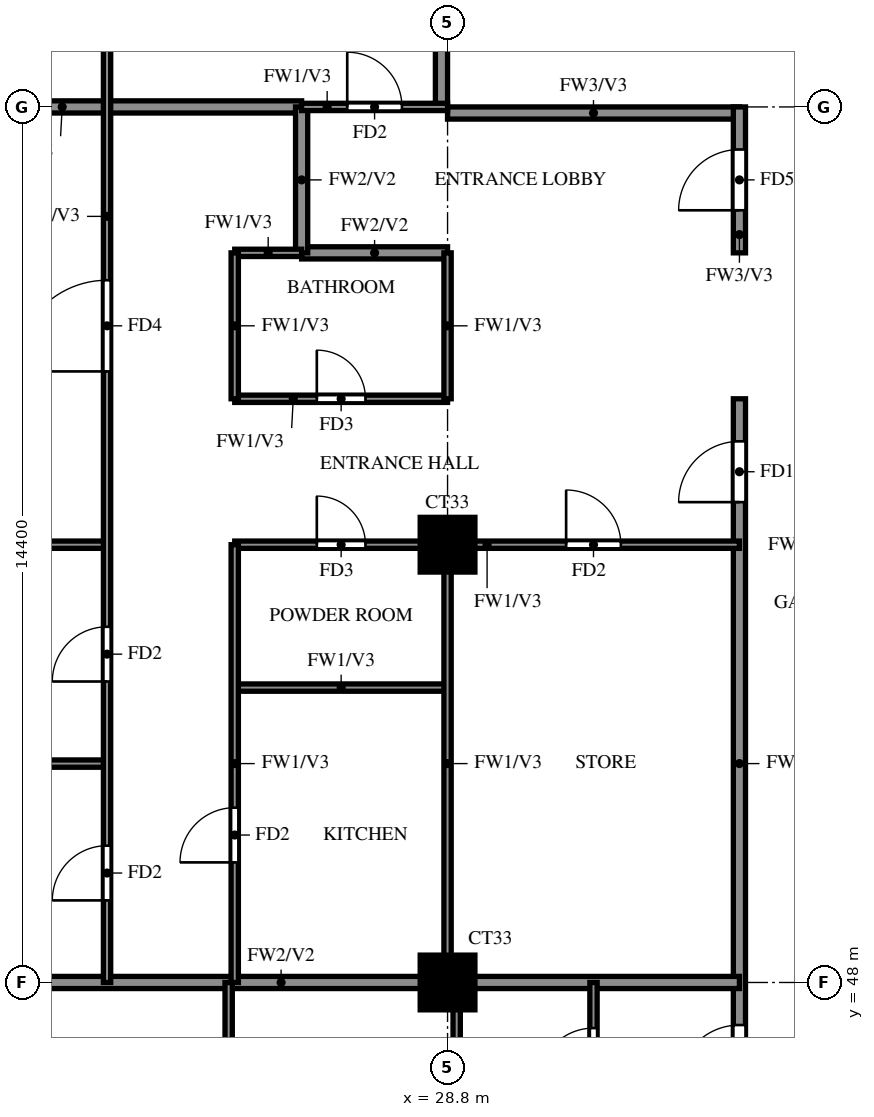
"""IFC4 building model, lengths in metres.
Left out: names, types, materials, properties, quantities, classifications, styles, units other than length and angle.
Written with IfcOpenShell. Run it as: python <this file> out.ifc"""

import sys

from ifc_helpers import new_model, si_unit, direction, frame, frame_2d, origin, origin_2d, place, context, subcontext, project, spatial, rectangle, extrude, source, transform, mapped, element, fill, save


model = new_model("IFC4")
c1 = context("Model", 3, precision=1e-05, world=origin(), true_north=direction((0.0, 1.0)))
c2 = subcontext(c1, "Body", "Model", "MODEL_VIEW")
j1 = project(units=[si_unit("LENGTHUNIT", "METRE"), si_unit("PLANEANGLEUNIT", "RADIAN")], contexts=[c1])
p1 = place(None, origin())
s1 = spatial("IfcSite", under=j1, at=p1, CompositionType="ELEMENT")
p2 = place(p1, origin())
s2 = spatial("IfcBuilding", under=s1, at=p2, CompositionType="ELEMENT")
p3 = place(p2, frame((0.0, 0.0, 229.0)))
s3 = spatial("IfcBuildingStorey", under=s2, at=p3, CompositionType="ELEMENT", Elevation=229.0)
m1 = source(origin(), c2, "Body", "SweptSolid", [
    extrude(rectangle(XDim=0.9, YDim=0.9, at=origin_2d()), origin(), (0.0, 0.0, 1.0), 3.22),
])
for number, where, z_axis, x_axis in (
    (1, (28.8, 48.0, 0.0), (0.0, 0.0, 1.0), (1.0, 0.0, 0.0)),
    (2, (28.8, 55.2, 0.0), (0.0, 0.0, 1.0), (1.0, 0.0, 0.0)),
):
    element("IfcColumn", number, at=place(p3, frame(where, z_axis=z_axis, x_axis=x_axis)), inside=s3, PredefinedType="COLUMN", context=c2, shape_type="MappedRepresentation", body=[
        mapped(m1, transform((0.0, 0.0, 0.0))),
    ])
p4 = place(p3, frame((28.8, 62.3, 0.0), z_axis=(0.0, 0.0, 1.0), x_axis=(1.0, 0.0, 0.0)))
e3 = element("IfcWall", 3, at=p4, inside=s3, PredefinedType="SOLIDWALL", context=c2, shape_type="SweptSolid", body=[
    extrude(rectangle(XDim=4.8, YDim=0.2, at=frame_2d((2.4, 0.0))), origin(), (0.0, 0.0, 1.0), 3.22),
])
p5 = place(p3, frame((28.7, 62.4, 0.0), z_axis=(0.0, 0.0, 1.0), x_axis=(0.0, 1.0, 0.0)))
e4 = element("IfcWall", 4, at=p5, inside=s3, PredefinedType="SOLIDWALL", context=c2, shape_type="SweptSolid", body=[
    extrude(rectangle(XDim=15.6, YDim=0.2, at=frame_2d((7.8, 0.0))), origin(), (0.0, 0.0, 1.0), 3.22),
])
p6 = place(p3, frame((33.6, 45.6, 0.0), z_axis=(0.0, 0.0, 1.0), x_axis=(0.0, 1.0, 0.0)))
e5 = element("IfcWall", 5, at=p6, inside=s3, PredefinedType="SOLIDWALL", context=c2, shape_type="SweptSolid", body=[
    extrude(rectangle(XDim=12.0, YDim=0.2, at=frame_2d((6.0, 0.0))), origin(), (0.0, 0.0, 1.0), 3.22),
])
p7 = place(p6, frame((0.7, 0.0, 0.0)))
e6 = element("IfcOpeningElement", 6, at=p7, cuts=e5, PredefinedType="OPENING", context=c2, shape_type="SweptSolid", body=[
    extrude(rectangle(XDim=1.0, YDim=2.1, at=frame_2d((0.5, 1.05))), frame((0.0, 0.11, 0.0), z_axis=(0.0, -1.0, 0.0), x_axis=(1.0, 0.0, 0.0)), (0.0, 0.0, 1.0), 0.22),
])
p8 = place(p6, frame((10.3, 0.0, 0.0)))
e7 = element("IfcOpeningElement", 7, at=p8, cuts=e5, PredefinedType="OPENING", context=c2, shape_type="SweptSolid", body=[
    extrude(rectangle(XDim=1.0, YDim=2.1, at=frame_2d((0.5, 1.05))), frame((0.0, 0.11, 0.0), z_axis=(0.0, -1.0, 0.0), x_axis=(1.0, 0.0, 0.0)), (0.0, 0.0, 1.0), 0.22),
])
p9 = place(p3, frame((33.6, 60.0, 0.0), z_axis=(0.0, 0.0, 1.0), x_axis=(0.0, 1.0, 0.0)))
e8 = element("IfcWall", 8, at=p9, inside=s3, PredefinedType="SOLIDWALL", context=c2, shape_type="SweptSolid", body=[
    extrude(rectangle(XDim=2.4, YDim=0.2, at=frame_2d((1.2, 0.0))), origin(), (0.0, 0.0, 1.0), 3.22),
])
p10 = place(p9, frame((0.7, 0.0, 0.0)))
e9 = element("IfcOpeningElement", 9, at=p10, cuts=e8, PredefinedType="OPENING", context=c2, shape_type="SweptSolid", body=[
    extrude(rectangle(XDim=1.0, YDim=2.1, at=frame_2d((0.5, 1.05))), frame((0.0, 0.11, 0.0), z_axis=(0.0, -1.0, 0.0), x_axis=(1.0, 0.0, 0.0)), (0.0, 0.0, 1.0), 0.22),
])
p11 = place(p3, frame((18.525, 48.0, 0.0), z_axis=(0.0, 0.0, 1.0), x_axis=(1.0, 0.0, 0.0)))
e10 = element("IfcWall", 10, at=p11, inside=s3, PredefinedType="SOLIDWALL", context=c2, shape_type="SweptSolid", body=[
    extrude(rectangle(XDim=15.075, YDim=0.2, at=frame_2d((7.538, 0.0))), origin(), (0.0, 0.0, 1.0), 3.22),
])
p12 = place(p3, frame((26.4, 60.0, 0.0), z_axis=(0.0, 0.0, 1.0), x_axis=(1.0, 0.0, 0.0)))
e11 = element("IfcWall", 11, at=p12, inside=s3, PredefinedType="SOLIDWALL", context=c2, shape_type="SweptSolid", body=[
    extrude(rectangle(XDim=2.4, YDim=0.2, at=frame_2d((1.2, 0.0))), origin(), (0.0, 0.0, 1.0), 3.22),
])
p13 = place(p3, frame((18.525, 62.4, 0.0), z_axis=(0.0, 0.0, 1.0), x_axis=(1.0, 0.0, 0.0)))
e12 = element("IfcWall", 12, at=p13, inside=s3, PredefinedType="SOLIDWALL", context=c2, shape_type="SweptSolid", body=[
    extrude(rectangle(XDim=7.875, YDim=0.2, at=frame_2d((3.938, 0.0))), origin(), (0.0, 0.0, 1.0), 3.22),
])
p14 = place(p3, frame((26.4, 60.0, 0.0), z_axis=(0.0, 0.0, 1.0), x_axis=(0.0, 1.0, 0.0)))
e13 = element("IfcWall", 13, at=p14, inside=s3, PredefinedType="SOLIDWALL", context=c2, shape_type="SweptSolid", body=[
    extrude(rectangle(XDim=2.4, YDim=0.2, at=frame_2d((1.2, 0.0))), origin(), (0.0, 0.0, 1.0), 3.22),
])
p15 = place(p3, frame((18.525, 51.6, 0.0), z_axis=(0.0, 0.0, 1.0), x_axis=(1.0, 0.0, 0.0)))
e14 = element("IfcWall", 14, at=p15, inside=s3, PredefinedType="PARTITIONING", context=c2, shape_type="SweptSolid", body=[
    extrude(rectangle(XDim=4.675, YDim=0.12, at=frame_2d((2.337, 0.0))), origin(), (0.0, 0.0, 1.0), 2.32),
])
p16 = place(p3, frame((25.3, 52.85, 0.0), z_axis=(0.0, 0.0, 1.0), x_axis=(1.0, 0.0, 0.0)))
e15 = element("IfcWall", 15, at=p16, inside=s3, PredefinedType="PARTITIONING", context=c2, shape_type="SweptSolid", body=[
    extrude(rectangle(XDim=3.5, YDim=0.12, at=frame_2d((1.75, 0.0))), origin(), (0.0, 0.0, 1.0), 3.22),
])
p17 = place(p3, frame((18.525, 55.2, 0.0), z_axis=(0.0, 0.0, 1.0), x_axis=(1.0, 0.0, 0.0)))
e16 = element("IfcWall", 16, at=p17, inside=s3, PredefinedType="PARTITIONING", context=c2, shape_type="SweptSolid", body=[
    extrude(rectangle(XDim=4.675, YDim=0.12, at=frame_2d((2.337, 0.0))), origin(), (0.0, 0.0, 1.0), 3.22),
])
p18 = place(p3, frame((25.3, 55.2, 0.0), z_axis=(0.0, 0.0, 1.0), x_axis=(1.0, 0.0, 0.0)))
e17 = element("IfcWall", 17, at=p18, inside=s3, PredefinedType="PARTITIONING", context=c2, shape_type="SweptSolid", body=[
    extrude(rectangle(XDim=8.3, YDim=0.12, at=frame_2d((4.15, 0.0))), origin(), (0.0, 0.0, 1.0), 3.22),
])
p19 = place(p18, frame((1.35, 0.0, 0.0)))
e18 = element("IfcOpeningElement", 18, at=p19, cuts=e17, PredefinedType="OPENING", context=c2, shape_type="SweptSolid", body=[
    extrude(rectangle(XDim=0.8, YDim=2.1, at=frame_2d((0.4, 1.05))), frame((0.0, 0.07, 0.0), z_axis=(0.0, -1.0, 0.0), x_axis=(1.0, 0.0, 0.0)), (0.0, 0.0, 1.0), 0.14),
])
p20 = place(p18, frame((5.45, 0.0, 0.0)))
e19 = element("IfcOpeningElement", 19, at=p20, cuts=e17, PredefinedType="OPENING", context=c2, shape_type="SweptSolid", body=[
    extrude(rectangle(XDim=0.9, YDim=2.1, at=frame_2d((0.45, 1.05))), frame((0.0, 0.07, 0.0), z_axis=(0.0, -1.0, 0.0), x_axis=(1.0, 0.0, 0.0)), (0.0, 0.0, 1.0), 0.14),
])
p21 = place(p3, frame((25.3, 57.6, 0.0), z_axis=(0.0, 0.0, 1.0), x_axis=(1.0, 0.0, 0.0)))
e20 = element("IfcWall", 20, at=p21, inside=s3, PredefinedType="PARTITIONING", context=c2, shape_type="SweptSolid", body=[
    extrude(rectangle(XDim=3.5, YDim=0.12, at=frame_2d((1.75, 0.0))), origin(), (0.0, 0.0, 1.0), 3.22),
])
p22 = place(p21, frame((1.35, 0.0, 0.0)))
e21 = element("IfcOpeningElement", 21, at=p22, cuts=e20, PredefinedType="OPENING", context=c2, shape_type="SweptSolid", body=[
    extrude(rectangle(XDim=0.8, YDim=2.1, at=frame_2d((0.4, 1.05))), frame((0.0, 0.07, 0.0), z_axis=(0.0, -1.0, 0.0), x_axis=(1.0, 0.0, 0.0)), (0.0, 0.0, 1.0), 0.14),
])
p23 = place(p3, frame((25.3, 60.0, 0.0), z_axis=(0.0, 0.0, 1.0), x_axis=(1.0, 0.0, 0.0)))
e22 = element("IfcWall", 22, at=p23, inside=s3, PredefinedType="PARTITIONING", context=c2, shape_type="SweptSolid", body=[
    extrude(rectangle(XDim=1.1, YDim=0.12, at=frame_2d((0.55, 0.0))), origin(), (0.0, 0.0, 1.0), 3.22),
])
p24 = place(p3, frame((26.4, 62.4, 0.0), z_axis=(0.0, 0.0, 1.0), x_axis=(1.0, 0.0, 0.0)))
e23 = element("IfcWall", 23, at=p24, inside=s3, PredefinedType="PARTITIONING", context=c2, shape_type="SweptSolid", body=[
    extrude(rectangle(XDim=2.4, YDim=0.12, at=frame_2d((1.2, 0.0))), origin(), (0.0, 0.0, 1.0), 3.22),
])
p25 = place(p24, frame((0.75, 0.0, 0.0)))
e24 = element("IfcOpeningElement", 24, at=p25, cuts=e23, PredefinedType="OPENING", context=c2, shape_type="SweptSolid", body=[
    extrude(rectangle(XDim=0.9, YDim=2.1, at=frame_2d((0.45, 1.05))), frame((0.0, 0.07, 0.0), z_axis=(0.0, -1.0, 0.0), x_axis=(1.0, 0.0, 0.0)), (0.0, 0.0, 1.0), 0.14),
])
p26 = place(p3, frame((23.2, 48.0, 0.0), z_axis=(0.0, 0.0, 1.0), x_axis=(0.0, 1.0, 0.0)))
e25 = element("IfcWall", 25, at=p26, inside=s3, PredefinedType="PARTITIONING", context=c2, shape_type="SweptSolid", body=[
    extrude(rectangle(XDim=25.2, YDim=0.12, at=frame_2d((12.6, 0.0))), origin(), (0.0, 0.0, 1.0), 3.22),
])
p27 = place(p26, frame((1.35, 0.0, 0.0)))
e26 = element("IfcOpeningElement", 26, at=p27, cuts=e25, PredefinedType="OPENING", context=c2, shape_type="SweptSolid", body=[
    extrude(rectangle(XDim=0.9, YDim=2.1, at=frame_2d((0.45, 1.05))), frame((0.0, 0.07, 0.0), z_axis=(0.0, -1.0, 0.0), x_axis=(1.0, 0.0, 0.0)), (0.0, 0.0, 1.0), 0.14),
])
p28 = place(p26, frame((4.95, 0.0, 0.0)))
e27 = element("IfcOpeningElement", 27, at=p28, cuts=e25, PredefinedType="OPENING", context=c2, shape_type="SweptSolid", body=[
    extrude(rectangle(XDim=0.9, YDim=2.1, at=frame_2d((0.45, 1.05))), frame((0.0, 0.07, 0.0), z_axis=(0.0, -1.0, 0.0), x_axis=(1.0, 0.0, 0.0)), (0.0, 0.0, 1.0), 0.14),
])
p29 = place(p26, frame((10.05, 0.0, 0.0)))
e28 = element("IfcOpeningElement", 28, at=p29, cuts=e25, PredefinedType="OPENING", context=c2, shape_type="SweptSolid", body=[
    extrude(rectangle(XDim=1.5, YDim=2.1, at=frame_2d((0.75, 1.05))), frame((0.0, 0.07, 0.0), z_axis=(0.0, -1.0, 0.0), x_axis=(1.0, 0.0, 0.0)), (0.0, 0.0, 1.0), 0.14),
])
p30 = place(p26, frame((15.75, 0.0, 0.0)))
e29 = element("IfcOpeningElement", 29, at=p30, cuts=e25, PredefinedType="OPENING", context=c2, shape_type="SweptSolid", body=[
    extrude(rectangle(XDim=0.9, YDim=2.1, at=frame_2d((0.45, 1.05))), frame((0.0, 0.07, 0.0), z_axis=(0.0, -1.0, 0.0), x_axis=(1.0, 0.0, 0.0)), (0.0, 0.0, 1.0), 0.14),
])
p31 = place(p26, frame((19.35, 0.0, 0.0)))
e30 = element("IfcOpeningElement", 30, at=p31, cuts=e25, PredefinedType="OPENING", context=c2, shape_type="SweptSolid", body=[
    extrude(rectangle(XDim=0.9, YDim=2.1, at=frame_2d((0.45, 1.05))), frame((0.0, 0.07, 0.0), z_axis=(0.0, -1.0, 0.0), x_axis=(1.0, 0.0, 0.0)), (0.0, 0.0, 1.0), 0.14),
])
p32 = place(p26, frame((22.95, 0.0, 0.0)))
e31 = element("IfcOpeningElement", 31, at=p32, cuts=e25, PredefinedType="OPENING", context=c2, shape_type="SweptSolid", body=[
    extrude(rectangle(XDim=0.9, YDim=2.1, at=frame_2d((0.45, 1.05))), frame((0.0, 0.07, 0.0), z_axis=(0.0, -1.0, 0.0), x_axis=(1.0, 0.0, 0.0)), (0.0, 0.0, 1.0), 0.14),
])
p33 = place(p3, frame((25.2, 39.725, 0.0), z_axis=(0.0, 0.0, 1.0), x_axis=(0.0, 1.0, 0.0)))
e32 = element("IfcWall", 32, at=p33, inside=s3, PredefinedType="PARTITIONING", context=c2, shape_type="SweptSolid", body=[
    extrude(rectangle(XDim=8.275, YDim=0.12, at=frame_2d((4.137, 0.0))), origin(), (0.0, 0.0, 1.0), 3.22),
])
p34 = place(p33, frame((4.525, 0.0, 0.0)))
e33 = element("IfcOpeningElement", 33, at=p34, cuts=e32, PredefinedType="OPENING", context=c2, shape_type="SweptSolid", body=[
    extrude(rectangle(XDim=0.9, YDim=2.1, at=frame_2d((0.45, 1.05))), frame((0.0, 0.07, 0.0), z_axis=(0.0, -1.0, 0.0), x_axis=(1.0, 0.0, 0.0)), (0.0, 0.0, 1.0), 0.14),
])
p35 = place(p3, frame((25.3, 48.0, 0.0), z_axis=(0.0, 0.0, 1.0), x_axis=(0.0, 1.0, 0.0)))
e34 = element("IfcWall", 34, at=p35, inside=s3, PredefinedType="PARTITIONING", context=c2, shape_type="SweptSolid", body=[
    extrude(rectangle(XDim=7.2, YDim=0.12, at=frame_2d((3.6, 0.0))), origin(), (0.0, 0.0, 1.0), 3.22),
])
p36 = place(p35, frame((1.975, 0.0, 0.0)))
e35 = element("IfcOpeningElement", 35, at=p36, cuts=e34, PredefinedType="OPENING", context=c2, shape_type="SweptSolid", body=[
    extrude(rectangle(XDim=0.9, YDim=2.1, at=frame_2d((0.45, 1.05))), frame((0.0, 0.07, 0.0), z_axis=(0.0, -1.0, 0.0), x_axis=(1.0, 0.0, 0.0)), (0.0, 0.0, 1.0), 0.14),
])
p37 = place(p3, frame((25.3, 57.6, 0.0), z_axis=(0.0, 0.0, 1.0), x_axis=(0.0, 1.0, 0.0)))
e36 = element("IfcWall", 36, at=p37, inside=s3, PredefinedType="PARTITIONING", context=c2, shape_type="SweptSolid", body=[
    extrude(rectangle(XDim=2.4, YDim=0.12, at=frame_2d((1.2, 0.0))), origin(), (0.0, 0.0, 1.0), 3.22),
])
p38 = place(p3, frame((28.8, 48.0, 0.0), z_axis=(0.0, 0.0, 1.0), x_axis=(0.0, 1.0, 0.0)))
e37 = element("IfcWall", 37, at=p38, inside=s3, PredefinedType="PARTITIONING", context=c2, shape_type="SweptSolid", body=[
    extrude(rectangle(XDim=7.2, YDim=0.12, at=frame_2d((3.6, 0.0))), origin(), (0.0, 0.0, 1.0), 3.22),
])
for number, where, z_axis, x_axis in (
    (38, (28.8, 57.6, 0.0), (0.0, 0.0, 1.0), (0.0, 1.0, 0.0)),
    (39, (28.95, 45.6, 0.0), (0.0, 0.0, 1.0), (0.0, 1.0, 0.0)),
):
    element("IfcWall", number, at=place(p3, frame(where, z_axis=z_axis, x_axis=x_axis)), inside=s3, PredefinedType="PARTITIONING", context=c2, shape_type="SweptSolid", body=[
        extrude(rectangle(XDim=2.4, YDim=0.12, at=frame_2d((1.2, 0.0))), origin(), (0.0, 0.0, 1.0), 3.22),
    ])
p39 = place(p3, frame((31.2, 45.6, 0.0), z_axis=(0.0, 0.0, 1.0), x_axis=(0.0, 1.0, 0.0)))
e40 = element("IfcWall", 40, at=p39, inside=s3, PredefinedType="PARTITIONING", context=c2, shape_type="SweptSolid", body=[
    extrude(rectangle(XDim=2.4, YDim=0.12, at=frame_2d((1.2, 0.0))), origin(), (0.0, 0.0, 1.0), 3.22),
])
p40 = place(p39, frame((0.75, 0.0, 0.0)))
e41 = element("IfcOpeningElement", 41, at=p40, cuts=e40, PredefinedType="OPENING", context=c2, shape_type="SweptSolid", body=[
    extrude(rectangle(XDim=0.9, YDim=2.1, at=frame_2d((0.45, 1.05))), frame((0.0, 0.07, 0.0), z_axis=(0.0, -1.0, 0.0), x_axis=(1.0, 0.0, 0.0)), (0.0, 0.0, 1.0), 0.14),
])
p41 = place(p7, origin())
e42 = element("IfcDoor", 42, at=p41, inside=s3, OperationType="SINGLE_SWING_LEFT", PredefinedType="DOOR", context=c2, shape_type="SweptSolid", body=[
    extrude(rectangle(XDim=1.0, YDim=2.1, at=frame_2d((0.5, 1.05))), frame((0.0, 0.025, 0.0), z_axis=(0.0, -1.0, 0.0), x_axis=(1.0, 0.0, 0.0)), (0.0, 0.0, 1.0), 0.05),
])
fill(e6, e42)
p42 = place(p40, origin())
e43 = element("IfcDoor", 43, at=p42, inside=s3, OperationType="SINGLE_SWING_RIGHT", PredefinedType="DOOR", context=c2, shape_type="SweptSolid", body=[
    extrude(rectangle(XDim=0.9, YDim=2.1, at=frame_2d((0.45, 1.05))), frame((0.0, 0.025, 0.0), z_axis=(0.0, -1.0, 0.0), x_axis=(1.0, 0.0, 0.0)), (0.0, 0.0, 1.0), 0.05),
])
fill(e41, e43)
p43 = place(p8, origin())
e44 = element("IfcDoor", 44, at=p43, inside=s3, OperationType="SINGLE_SWING_LEFT", PredefinedType="DOOR", context=c2, shape_type="SweptSolid", body=[
    extrude(rectangle(XDim=1.0, YDim=2.1, at=frame_2d((0.5, 1.05))), frame((0.0, 0.025, 0.0), z_axis=(0.0, -1.0, 0.0), x_axis=(1.0, 0.0, 0.0)), (0.0, 0.0, 1.0), 0.05),
])
fill(e7, e44)
p44 = place(p27, origin())
e45 = element("IfcDoor", 45, at=p44, inside=s3, OperationType="SINGLE_SWING_RIGHT", PredefinedType="DOOR", context=c2, shape_type="SweptSolid", body=[
    extrude(rectangle(XDim=0.9, YDim=2.1, at=frame_2d((0.45, 1.05))), frame((0.0, 0.025, 0.0), z_axis=(0.0, -1.0, 0.0), x_axis=(1.0, 0.0, 0.0)), (0.0, 0.0, 1.0), 0.05),
])
fill(e26, e45)
p45 = place(p28, origin())
e46 = element("IfcDoor", 46, at=p45, inside=s3, OperationType="SINGLE_SWING_LEFT", PredefinedType="DOOR", context=c2, shape_type="SweptSolid", body=[
    extrude(rectangle(XDim=0.9, YDim=2.1, at=frame_2d((0.45, 1.05))), frame((0.0, 0.025, 0.0), z_axis=(0.0, -1.0, 0.0), x_axis=(1.0, 0.0, 0.0)), (0.0, 0.0, 1.0), 0.05),
])
fill(e27, e46)
p46 = place(p29, origin())
e47 = element("IfcDoor", 47, at=p46, inside=s3, OperationType="SINGLE_SWING_LEFT", PredefinedType="DOOR", context=c2, shape_type="SweptSolid", body=[
    extrude(rectangle(XDim=1.5, YDim=2.1, at=frame_2d((0.75, 1.05))), frame((0.0, 0.025, 0.0), z_axis=(0.0, -1.0, 0.0), x_axis=(1.0, 0.0, 0.0)), (0.0, 0.0, 1.0), 0.05),
])
fill(e28, e47)
p47 = place(p36, origin())
e48 = element("IfcDoor", 48, at=p47, inside=s3, OperationType="SINGLE_SWING_RIGHT", PredefinedType="DOOR", context=c2, shape_type="SweptSolid", body=[
    extrude(rectangle(XDim=0.9, YDim=2.1, at=frame_2d((0.45, 1.05))), frame((0.0, 0.025, 0.0), z_axis=(0.0, -1.0, 0.0), x_axis=(1.0, 0.0, 0.0)), (0.0, 0.0, 1.0), 0.05),
])
fill(e35, e48)
p48 = place(p19, origin())
e49 = element("IfcDoor", 49, at=p48, inside=s3, OperationType="SINGLE_SWING_LEFT", PredefinedType="DOOR", context=c2, shape_type="SweptSolid", body=[
    extrude(rectangle(XDim=0.8, YDim=2.1, at=frame_2d((0.4, 1.05))), frame((0.0, 0.025, 0.0), z_axis=(0.0, -1.0, 0.0), x_axis=(1.0, 0.0, 0.0)), (0.0, 0.0, 1.0), 0.05),
])
fill(e18, e49)
p49 = place(p22, origin())
e50 = element("IfcDoor", 50, at=p49, inside=s3, OperationType="SINGLE_SWING_LEFT", PredefinedType="DOOR", context=c2, shape_type="SweptSolid", body=[
    extrude(rectangle(XDim=0.8, YDim=2.1, at=frame_2d((0.4, 1.05))), frame((0.0, 0.025, 0.0), z_axis=(0.0, -1.0, 0.0), x_axis=(1.0, 0.0, 0.0)), (0.0, 0.0, 1.0), 0.05),
])
fill(e21, e50)
p50 = place(p20, origin())
e51 = element("IfcDoor", 51, at=p50, inside=s3, OperationType="SINGLE_SWING_RIGHT", PredefinedType="DOOR", context=c2, shape_type="SweptSolid", body=[
    extrude(rectangle(XDim=0.9, YDim=2.1, at=frame_2d((0.45, 1.05))), frame((0.0, 0.025, 0.0), z_axis=(0.0, -1.0, 0.0), x_axis=(1.0, 0.0, 0.0)), (0.0, 0.0, 1.0), 0.05),
])
fill(e19, e51)
p51 = place(p25, origin())
e52 = element("IfcDoor", 52, at=p51, inside=s3, OperationType="SINGLE_SWING_RIGHT", PredefinedType="DOOR", context=c2, shape_type="SweptSolid", body=[
    extrude(rectangle(XDim=0.9, YDim=2.1, at=frame_2d((0.45, 1.05))), frame((0.0, 0.025, 0.0), z_axis=(0.0, -1.0, 0.0), x_axis=(1.0, 0.0, 0.0)), (0.0, 0.0, 1.0), 0.05),
])
fill(e24, e52)
p52 = place(p10, origin())
e53 = element("IfcDoor", 53, at=p52, inside=s3, OperationType="SINGLE_SWING_LEFT", PredefinedType="DOOR", context=c2, shape_type="SweptSolid", body=[
    extrude(rectangle(XDim=1.0, YDim=2.1, at=frame_2d((0.5, 1.05))), frame((0.0, 0.025, 0.0), z_axis=(0.0, -1.0, 0.0), x_axis=(1.0, 0.0, 0.0)), (0.0, 0.0, 1.0), 0.05),
])
fill(e9, e53)
save(model, sys.argv[1])
